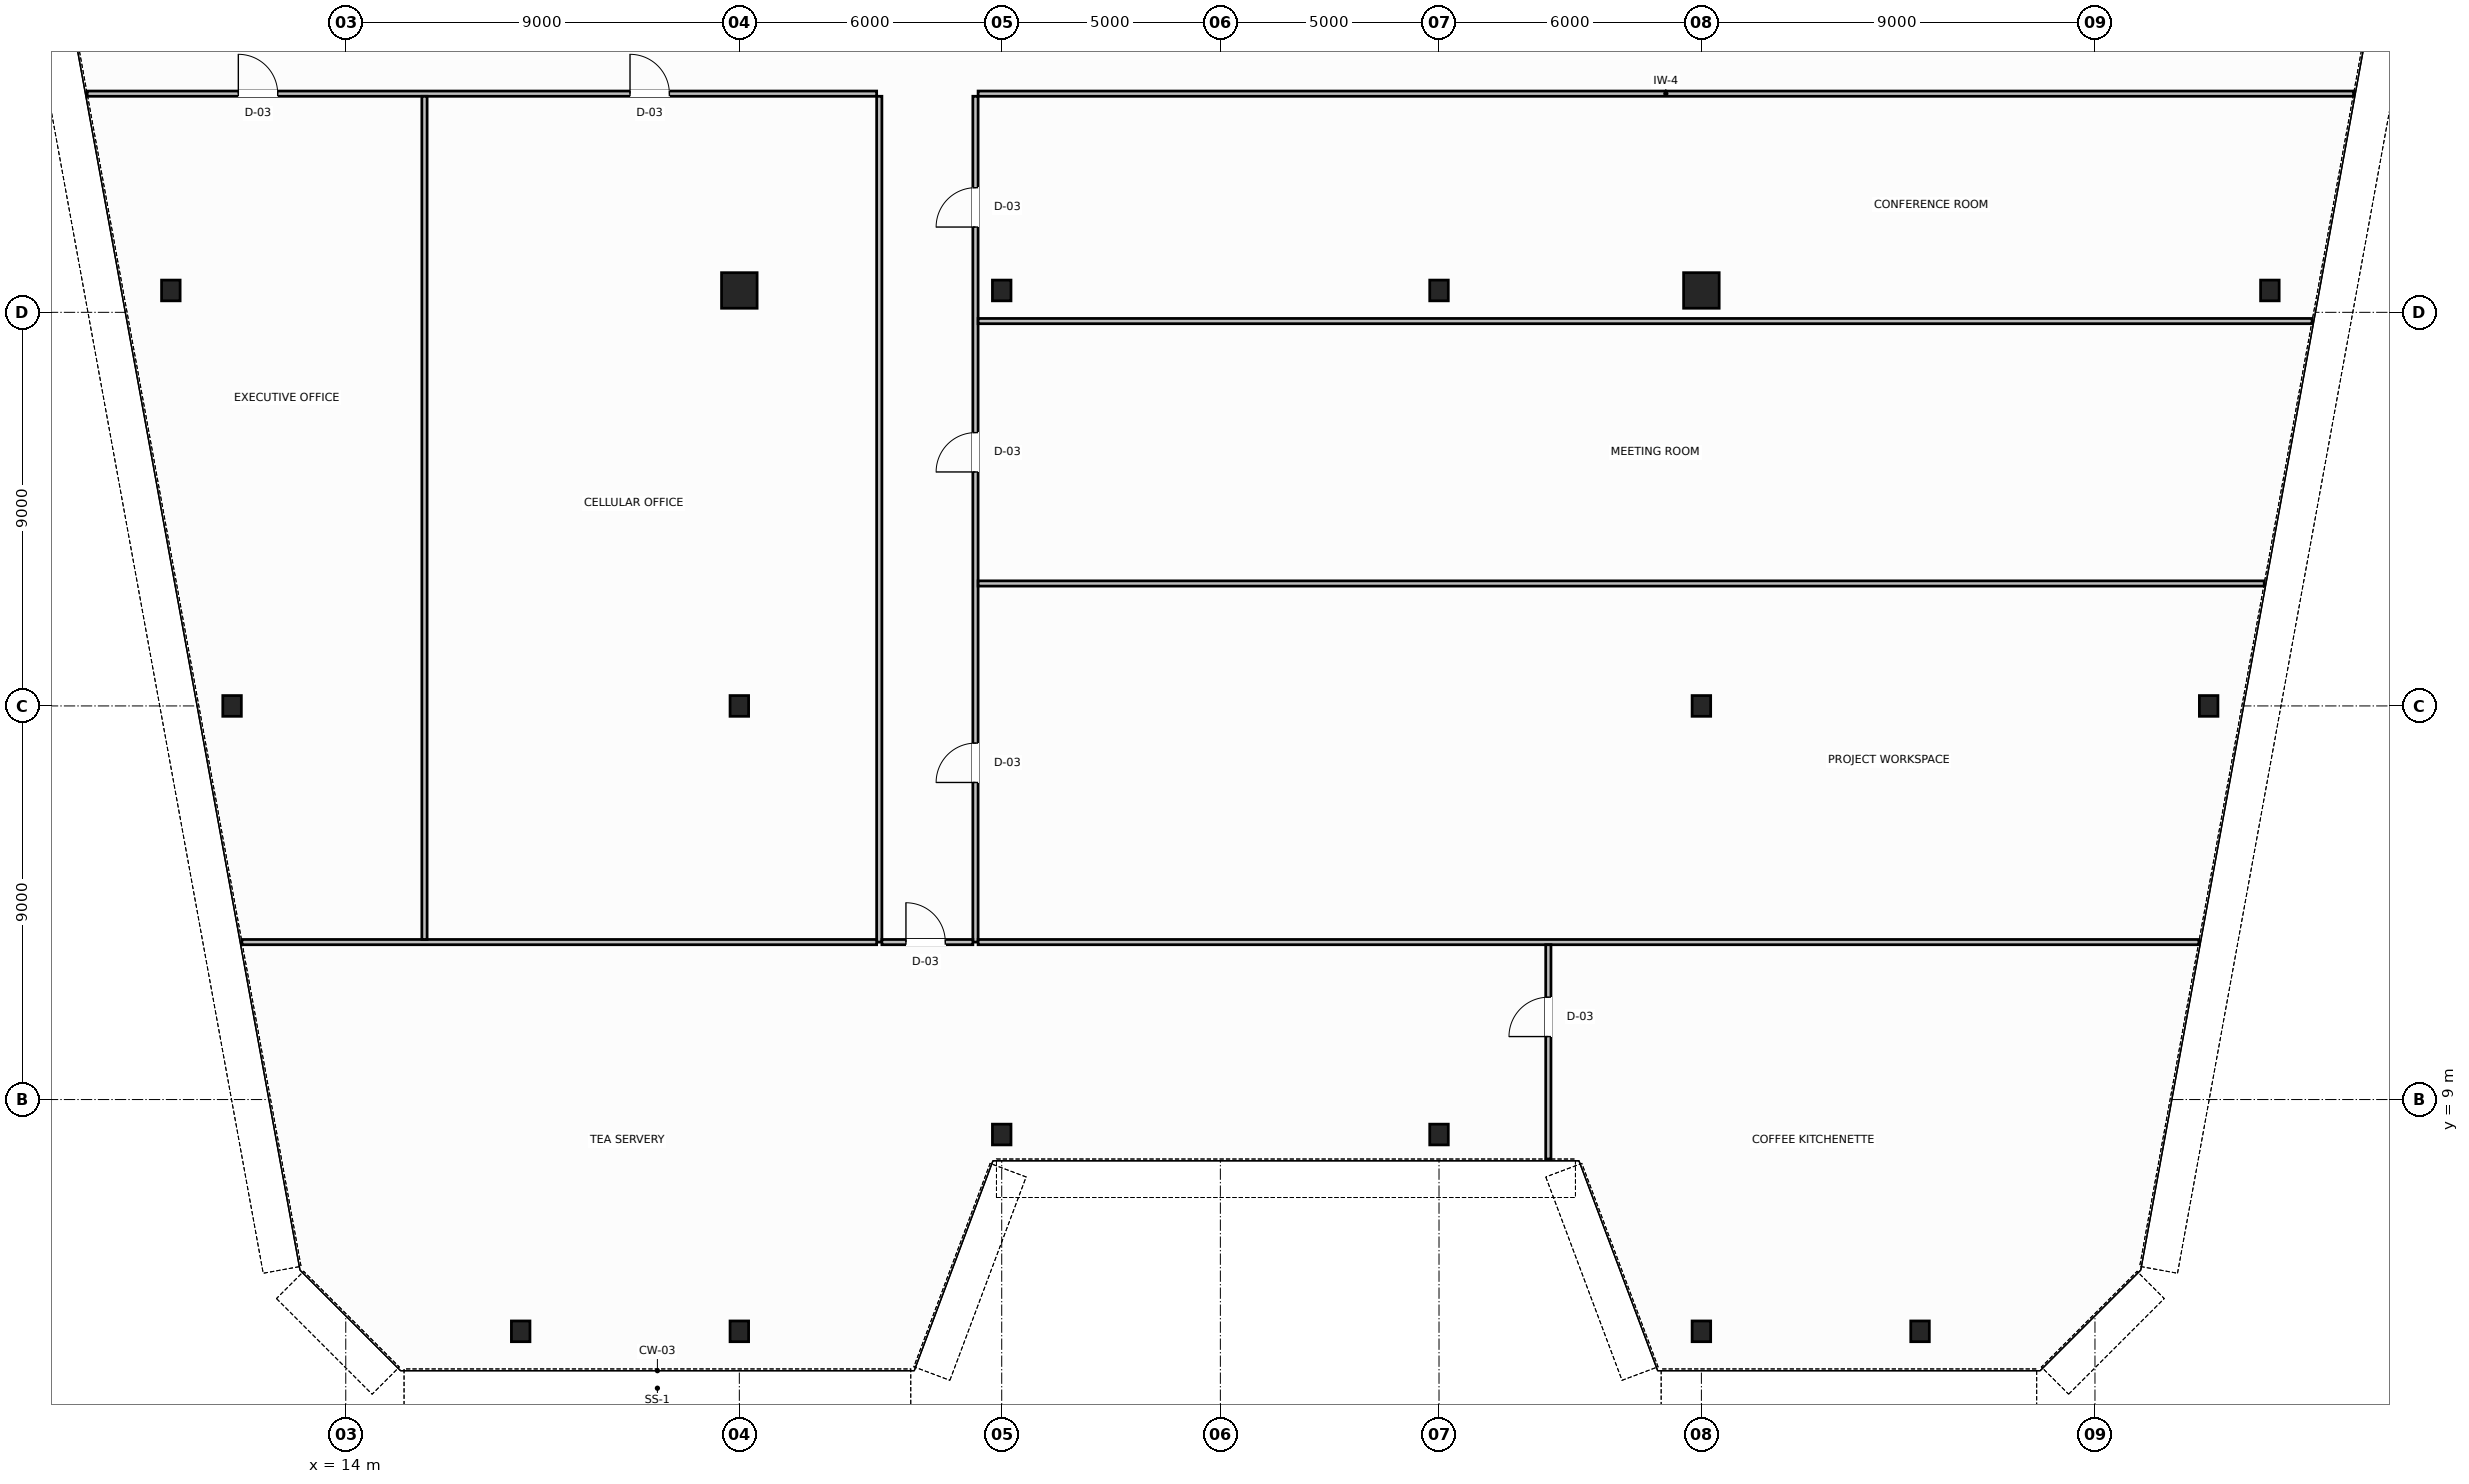
"""IFC4 building model, lengths in metres.
Left out: names, types, materials, properties, quantities, classifications, styles, units other than length and angle.
Written with IfcOpenShell. Run it as: python <this file> out.ifc"""

import sys

from ifc_helpers import new_model, si_unit, direction, frame, frame_2d, origin, origin_2d, place, context, subcontext, project, spatial, rectangle, hollow_circle, i_section, extrude, source, transform, mapped, element, fill, save


model = new_model("IFC4")
c1 = context("Model", 3, precision=1e-05, world=origin(), true_north=direction((0.0, 1.0)))
c2 = subcontext(c1, "Body", "Model", "MODEL_VIEW")
j1 = project(units=[si_unit("LENGTHUNIT", "METRE"), si_unit("PLANEANGLEUNIT", "RADIAN")], contexts=[c1])
p1 = place(None, origin())
s1 = spatial("IfcSite", under=j1, at=p1, CompositionType="ELEMENT")
p2 = place(p1, origin())
s2 = spatial("IfcBuilding", under=s1, at=p2, CompositionType="ELEMENT")
p3 = place(p2, frame((0.0, 0.0, 161.4)))
s3 = spatial("IfcBuildingStorey", under=s2, at=p3, CompositionType="ELEMENT", Elevation=161.4)
m1 = source(origin(), c2, "Body", "SweptSolid", [
    extrude(i_section(OverallWidth=0.424, OverallDepth=0.474, WebThickness=0.047, FlangeThickness=0.065, FilletRadius=0.015, at=origin_2d()), origin(), (0.0, 0.0, 1.0), 3.8),
])
for number, where, z_axis, x_axis in (
    (1, (10.0, 27.5, 0.0), (0.0, 0.0, 1.0), (1.0, 0.0, 0.0)),
    (2, (11.4, 18.0, 0.0), (0.0, 0.0, 1.0), (1.0, 0.0, 0.0)),
    (3, (58.0, 27.5, 0.0), (0.0, 0.0, 1.0), (1.0, 0.0, 0.0)),
    (4, (56.6, 18.0, 0.0), (0.0, 0.0, 1.0), (1.0, 0.0, 0.0)),
):
    element("IfcColumn", number, at=place(p3, frame(where, z_axis=z_axis, x_axis=x_axis)), inside=s3, PredefinedType="COLUMN", context=c2, shape_type="MappedRepresentation", body=[
        mapped(m1, transform((0.0, 0.0, 0.0), scale=1.0)),
    ])
m2 = source(origin(), c2, "Body", "SweptSolid", [
    extrude(hollow_circle(Radius=0.406, WallThickness=0.04, at=origin_2d()), origin(), (0.0, 0.0, 1.0), 3.8),
])
p4 = place(p3, frame((23.0, 27.5, 0.0), z_axis=(0.0, 0.0, 1.0), x_axis=(1.0, 0.0, 0.0)))
e5 = element("IfcColumn", 5, at=p4, inside=s3, PredefinedType="COLUMN", context=c2, shape_type="MappedRepresentation", body=[
    mapped(m2, transform((0.0, 0.0, 0.0), scale=1.0)),
])
m3 = source(origin(), c2, "Body", "SweptSolid", [
    extrude(i_section(OverallWidth=0.424, OverallDepth=0.474, WebThickness=0.047, FlangeThickness=0.065, FilletRadius=0.015, at=origin_2d()), origin(), (0.0, 0.0, 1.0), 3.8),
])
for number, where, z_axis, x_axis in (
    (6, (29.0, 27.5, 0.0), (0.0, 0.0, 1.0), (1.0, 0.0, 0.0)),
    (7, (39.0, 27.5, 0.0), (0.0, 0.0, 1.0), (1.0, 0.0, 0.0)),
):
    element("IfcColumn", number, at=place(p3, frame(where, z_axis=z_axis, x_axis=x_axis)), inside=s3, PredefinedType="COLUMN", context=c2, shape_type="MappedRepresentation", body=[
        mapped(m3, transform((0.0, 0.0, 0.0), scale=1.0)),
    ])
p5 = place(p3, frame((45.0, 27.5, 0.0), z_axis=(0.0, 0.0, 1.0), x_axis=(1.0, 0.0, 0.0)))
e8 = element("IfcColumn", 8, at=p5, inside=s3, PredefinedType="COLUMN", context=c2, shape_type="MappedRepresentation", body=[
    mapped(m2, transform((0.0, 0.0, 0.0), scale=1.0)),
])
for number, where, z_axis, x_axis in (
    (9, (23.0, 18.0, 0.0), (0.0, 0.0, 1.0), (1.0, 0.0, 0.0)),
    (10, (45.0, 18.0, 0.0), (0.0, 0.0, 1.0), (1.0, 0.0, 0.0)),
    (11, (18.0, 3.7, 0.0), (0.0, 0.0, 1.0), (1.0, 0.0, 0.0)),
    (12, (23.0, 3.7, 0.0), (0.0, 0.0, 1.0), (1.0, 0.0, 0.0)),
    (13, (29.0, 8.2, 0.0), (0.0, 0.0, 1.0), (1.0, 0.0, 0.0)),
    (14, (39.0, 8.2, 0.0), (0.0, 0.0, 1.0), (1.0, 0.0, 0.0)),
    (15, (45.0, 3.7, 0.0), (0.0, 0.0, 1.0), (1.0, 0.0, 0.0)),
    (16, (50.0, 3.7, 0.0), (0.0, 0.0, 1.0), (1.0, 0.0, 0.0)),
):
    element("IfcColumn", number, at=place(p3, frame(where, z_axis=z_axis, x_axis=x_axis)), inside=s3, PredefinedType="COLUMN", context=c2, shape_type="MappedRepresentation", body=[
        mapped(m3, transform((0.0, 0.0, 0.0), scale=1.0)),
    ])
p6 = place(p3, frame((8.086, 32.0, 0.0), z_axis=(0.0, 0.0, 1.0), x_axis=(1.0, 0.0, 0.0)))
e17 = element("IfcWall", 17, at=p6, inside=s3, PredefinedType="PARTITIONING", context=c2, shape_type="SweptSolid", body=[
    extrude(rectangle(XDim=18.054, YDim=0.12, at=frame_2d((9.027, 0.0))), origin(), (0.0, 0.0, 1.0), 3.58),
])
p7 = place(p6, frame((3.457, 0.0, 0.0)))
e18 = element("IfcOpeningElement", 18, at=p7, cuts=e17, PredefinedType="OPENING", context=c2, shape_type="SweptSolid", body=[
    extrude(rectangle(XDim=0.9, YDim=2.15, at=frame_2d((0.45, 1.075))), frame((0.0, 0.07, 0.0), z_axis=(0.0, -1.0, 0.0), x_axis=(1.0, 0.0, 0.0)), (0.0, 0.0, 1.0), 0.14),
])
p8 = place(p6, frame((12.414, 0.0, 0.0)))
e19 = element("IfcOpeningElement", 19, at=p8, cuts=e17, PredefinedType="OPENING", context=c2, shape_type="SweptSolid", body=[
    extrude(rectangle(XDim=0.9, YDim=2.15, at=frame_2d((0.45, 1.075))), frame((0.0, 0.07, 0.0), z_axis=(0.0, -1.0, 0.0), x_axis=(1.0, 0.0, 0.0)), (0.0, 0.0, 1.0), 0.14),
])
p9 = place(p3, frame((28.46, 32.0, 0.0), z_axis=(0.0, 0.0, 1.0), x_axis=(1.0, 0.0, 0.0)))
e20 = element("IfcWall", 20, at=p9, inside=s3, PredefinedType="PARTITIONING", context=c2, shape_type="SweptSolid", body=[
    extrude(rectangle(XDim=31.454, YDim=0.12, at=frame_2d((15.727, 0.0))), origin(), (0.0, 0.0, 1.0), 3.58),
])
p10 = place(p3, frame((26.2, 12.6, 0.0), z_axis=(0.0, 0.0, 1.0), x_axis=(0.0, 1.0, 0.0)))
e21 = element("IfcWall", 21, at=p10, inside=s3, PredefinedType="PARTITIONING", context=c2, shape_type="SweptSolid", body=[
    extrude(rectangle(XDim=19.34, YDim=0.12, at=frame_2d((9.67, 0.0))), origin(), (0.0, 0.0, 1.0), 3.58),
])
p11 = place(p3, frame((28.4, 12.6, 0.0), z_axis=(0.0, 0.0, 1.0), x_axis=(0.0, 1.0, 0.0)))
e22 = element("IfcWall", 22, at=p11, inside=s3, PredefinedType="PARTITIONING", context=c2, shape_type="SweptSolid", body=[
    extrude(rectangle(XDim=19.34, YDim=0.12, at=frame_2d((9.67, 0.0))), origin(), (0.0, 0.0, 1.0), 3.58),
])
p12 = place(p11, frame((3.65, 0.0, 0.0)))
e23 = element("IfcOpeningElement", 23, at=p12, cuts=e22, PredefinedType="OPENING", context=c2, shape_type="SweptSolid", body=[
    extrude(rectangle(XDim=0.9, YDim=2.15, at=frame_2d((0.45, 1.075))), frame((0.0, 0.07, 0.0), z_axis=(0.0, -1.0, 0.0), x_axis=(1.0, 0.0, 0.0)), (0.0, 0.0, 1.0), 0.14),
])
p13 = place(p11, frame((10.75, 0.0, 0.0)))
e24 = element("IfcOpeningElement", 24, at=p13, cuts=e22, PredefinedType="OPENING", context=c2, shape_type="SweptSolid", body=[
    extrude(rectangle(XDim=0.9, YDim=2.15, at=frame_2d((0.45, 1.075))), frame((0.0, 0.07, 0.0), z_axis=(0.0, -1.0, 0.0), x_axis=(1.0, 0.0, 0.0)), (0.0, 0.0, 1.0), 0.14),
])
p14 = place(p11, frame((16.35, 0.0, 0.0)))
e25 = element("IfcOpeningElement", 25, at=p14, cuts=e22, PredefinedType="OPENING", context=c2, shape_type="SweptSolid", body=[
    extrude(rectangle(XDim=0.9, YDim=2.15, at=frame_2d((0.45, 1.075))), frame((0.0, 0.07, 0.0), z_axis=(0.0, -1.0, 0.0), x_axis=(1.0, 0.0, 0.0)), (0.0, 0.0, 1.0), 0.14),
])
p15 = place(p3, frame((26.26, 12.6, 0.0), z_axis=(0.0, 0.0, 1.0), x_axis=(1.0, 0.0, 0.0)))
e26 = element("IfcWall", 26, at=p15, inside=s3, PredefinedType="PARTITIONING", context=c2, shape_type="SweptSolid", body=[
    extrude(rectangle(XDim=2.08, YDim=0.12, at=frame_2d((1.04, 0.0))), origin(), (0.0, 0.0, 1.0), 3.58),
])
p16 = place(p15, frame((0.55, 0.0, 0.0)))
e27 = element("IfcOpeningElement", 27, at=p16, cuts=e26, PredefinedType="OPENING", context=c2, shape_type="SweptSolid", body=[
    extrude(rectangle(XDim=0.9, YDim=2.15, at=frame_2d((0.45, 1.075))), frame((0.0, 0.07, 0.0), z_axis=(0.0, -1.0, 0.0), x_axis=(1.0, 0.0, 0.0)), (0.0, 0.0, 1.0), 0.14),
])
p17 = place(p3, frame((11.625, 12.6, 0.0), z_axis=(0.0, 0.0, 1.0), x_axis=(1.0, 0.0, 0.0)))
e28 = element("IfcWall", 28, at=p17, inside=s3, PredefinedType="PARTITIONING", context=c2, shape_type="SweptSolid", body=[
    extrude(rectangle(XDim=14.515, YDim=0.12, at=frame_2d((7.257, 0.0))), origin(), (0.0, 0.0, 1.0), 3.58),
])
p18 = place(p3, frame((28.46, 12.6, 0.0), z_axis=(0.0, 0.0, 1.0), x_axis=(1.0, 0.0, 0.0)))
e29 = element("IfcWall", 29, at=p18, inside=s3, PredefinedType="PARTITIONING", context=c2, shape_type="SweptSolid", body=[
    extrude(rectangle(XDim=27.915, YDim=0.12, at=frame_2d((13.958, 0.0))), origin(), (0.0, 0.0, 1.0), 3.58),
])
p19 = place(p3, frame((41.5, 7.64, 0.0), z_axis=(0.0, 0.0, 1.0), x_axis=(0.0, 1.0, 0.0)))
e30 = element("IfcWall", 30, at=p19, inside=s3, PredefinedType="PARTITIONING", context=c2, shape_type="SweptSolid", body=[
    extrude(rectangle(XDim=4.9, YDim=0.12, at=frame_2d((2.45, 0.0))), origin(), (0.0, 0.0, 1.0), 3.58),
])
p20 = place(p19, frame((2.8, 0.0, 0.0)))
e31 = element("IfcOpeningElement", 31, at=p20, cuts=e30, PredefinedType="OPENING", context=c2, shape_type="SweptSolid", body=[
    extrude(rectangle(XDim=0.9, YDim=2.15, at=frame_2d((0.45, 1.075))), frame((0.0, 0.07, 0.0), z_axis=(0.0, -1.0, 0.0), x_axis=(1.0, 0.0, 0.0)), (0.0, 0.0, 1.0), 0.14),
])
p21 = place(p3, frame((15.8, 12.66, 0.0), z_axis=(0.0, 0.0, 1.0), x_axis=(0.0, 1.0, 0.0)))
e32 = element("IfcWall", 32, at=p21, inside=s3, PredefinedType="PARTITIONING", context=c2, shape_type="SweptSolid", body=[
    extrude(rectangle(XDim=19.28, YDim=0.12, at=frame_2d((9.64, 0.0))), origin(), (0.0, 0.0, 1.0), 3.58),
])
p22 = place(p3, frame((28.46, 20.8, 0.0), z_axis=(0.0, 0.0, 1.0), x_axis=(1.0, 0.0, 0.0)))
e33 = element("IfcWall", 33, at=p22, inside=s3, PredefinedType="PARTITIONING", context=c2, shape_type="SweptSolid", body=[
    extrude(rectangle(XDim=29.411, YDim=0.12, at=frame_2d((14.706, 0.0))), origin(), (0.0, 0.0, 1.0), 3.58),
])
p23 = place(p3, frame((28.46, 26.8, 0.0), z_axis=(0.0, 0.0, 1.0), x_axis=(1.0, 0.0, 0.0)))
e34 = element("IfcWall", 34, at=p23, inside=s3, PredefinedType="PARTITIONING", context=c2, shape_type="SweptSolid", body=[
    extrude(rectangle(XDim=30.505, YDim=0.12, at=frame_2d((15.253, 0.0))), origin(), (0.0, 0.0, 1.0), 3.58),
])
m4 = source(origin(), c2, "Body", "SweptSolid", [
    extrude(rectangle(XDim=0.9, YDim=2.15, at=frame_2d((0.45, 1.075))), frame((0.0, 0.025, 0.0), z_axis=(0.0, -1.0, 0.0), x_axis=(1.0, 0.0, 0.0)), (0.0, 0.0, 1.0), 0.05),
])
p24 = place(p16, origin())
e35 = element("IfcDoor", 35, at=p24, inside=s3, OperationType="SINGLE_SWING_LEFT", PredefinedType="DOOR", context=c2, shape_type="MappedRepresentation", body=[
    mapped(m4, transform((0.0, 0.0, 0.0), scale=1.0)),
])
fill(e27, e35)
p25 = place(p20, origin())
e36 = element("IfcDoor", 36, at=p25, inside=s3, OperationType="SINGLE_SWING_RIGHT", PredefinedType="DOOR", context=c2, shape_type="MappedRepresentation", body=[
    mapped(m4, transform((0.0, 0.0, 0.0), scale=1.0)),
])
fill(e31, e36)
p26 = place(p7, origin())
e37 = element("IfcDoor", 37, at=p26, inside=s3, OperationType="SINGLE_SWING_LEFT", PredefinedType="DOOR", context=c2, shape_type="MappedRepresentation", body=[
    mapped(m4, transform((0.0, 0.0, 0.0), scale=1.0)),
])
fill(e18, e37)
p27 = place(p8, origin())
e38 = element("IfcDoor", 38, at=p27, inside=s3, OperationType="SINGLE_SWING_RIGHT", PredefinedType="DOOR", context=c2, shape_type="MappedRepresentation", body=[
    mapped(m4, transform((0.0, 0.0, 0.0), scale=1.0)),
])
fill(e19, e38)
p28 = place(p12, origin())
e39 = element("IfcDoor", 39, at=p28, inside=s3, OperationType="SINGLE_SWING_RIGHT", PredefinedType="DOOR", context=c2, shape_type="MappedRepresentation", body=[
    mapped(m4, transform((0.0, 0.0, 0.0), scale=1.0)),
])
fill(e23, e39)
p29 = place(p13, origin())
e40 = element("IfcDoor", 40, at=p29, inside=s3, OperationType="SINGLE_SWING_LEFT", PredefinedType="DOOR", context=c2, shape_type="MappedRepresentation", body=[
    mapped(m4, transform((0.0, 0.0, 0.0), scale=1.0)),
])
fill(e24, e40)
p30 = place(p14, origin())
e41 = element("IfcDoor", 41, at=p30, inside=s3, OperationType="SINGLE_SWING_RIGHT", PredefinedType="DOOR", context=c2, shape_type="MappedRepresentation", body=[
    mapped(m4, transform((0.0, 0.0, 0.0), scale=1.0)),
])
fill(e25, e41)
save(model, sys.argv[1])
